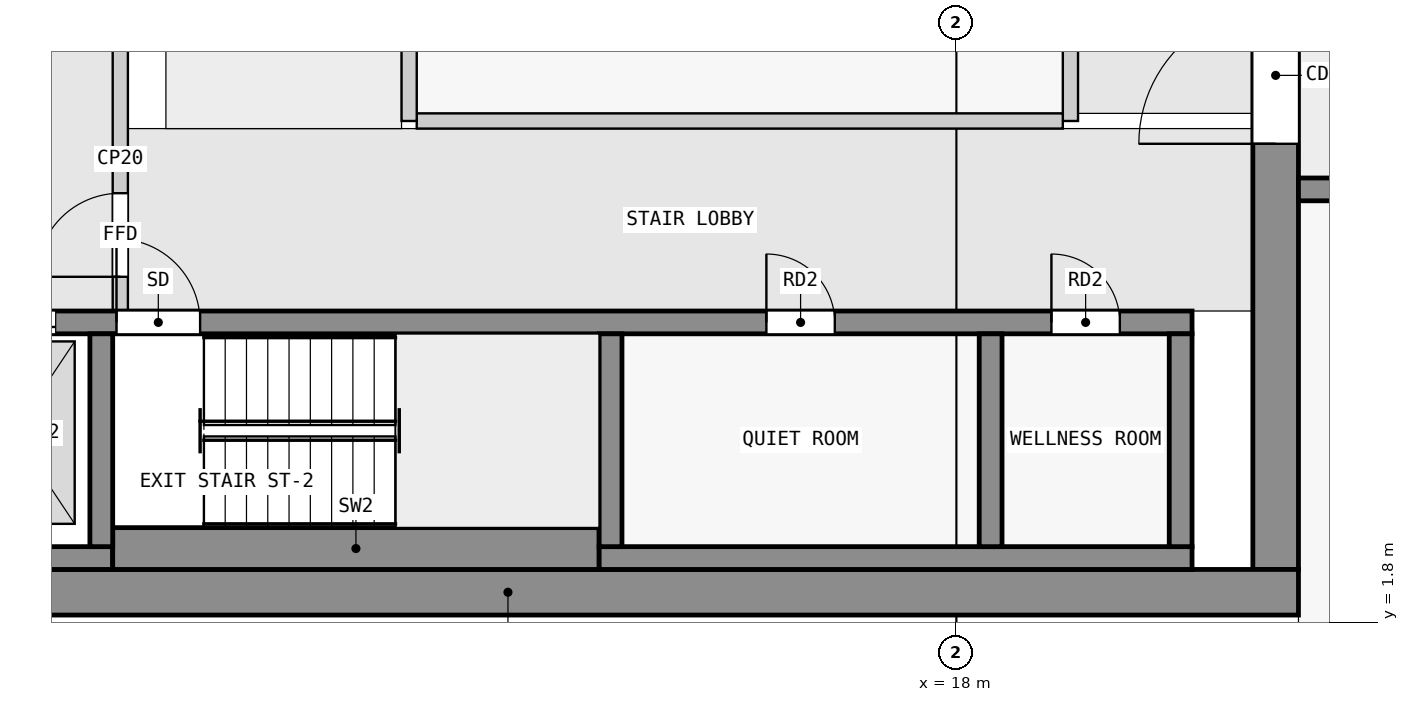
"""IFC4 building model, lengths in metres.
Left out: names, types, materials, properties, quantities, classifications, styles, units other than length and angle.
Written with IfcOpenShell. Run it as: python <this file> out.ifc"""

import sys

from ifc_helpers import new_model, si_unit, direction, frame, frame_2d, origin, place, context, subcontext, project, spatial, rectangle, extrude, element, fill, save


model = new_model("IFC4")
c1 = context("Model", 3, precision=1e-05, world=origin(), true_north=direction((0.0, 1.0)))
c2 = subcontext(c1, "Body", "Model", "MODEL_VIEW")
j1 = project(units=[si_unit("LENGTHUNIT", "METRE"), si_unit("PLANEANGLEUNIT", "RADIAN")], contexts=[c1])
p1 = place(None, origin())
s1 = spatial("IfcSite", under=j1, at=p1, CompositionType="ELEMENT")
p2 = place(p1, origin())
s2 = spatial("IfcBuilding", under=s1, at=p2, CompositionType="ELEMENT")
p3 = place(p2, frame((0.0, 0.0, 170.9)))
s3 = spatial("IfcBuildingStorey", under=s2, at=p3, CompositionType="ELEMENT", Elevation=170.9)
p4 = place(p3, frame((1.7, 2.2, 0.0), z_axis=(0.0, 0.0, 1.0), x_axis=(1.0, 0.0, 0.0)))
e1 = element("IfcWall", 1, at=p4, inside=s3, PredefinedType="SHEAR", context=c2, shape_type="SweptSolid", body=[
    extrude(rectangle(XDim=20.8, YDim=0.6, at=frame_2d((10.4, 0.0))), origin(), (0.0, 0.0, 1.0), 3.25),
])
p5 = place(p3, frame((22.2, 2.5, 0.0), z_axis=(0.0, 0.0, 1.0), x_axis=(0.0, 1.0, 0.0)))
e2 = element("IfcWall", 2, at=p5, inside=s3, PredefinedType="SHEAR", context=c2, shape_type="SweptSolid", body=[
    extrude(rectangle(XDim=14.9, YDim=0.6, at=frame_2d((7.45, 0.0))), origin(), (0.0, 0.0, 1.0), 3.25),
])
p6 = place(p5, frame((5.6, 0.0, 0.0)))
e3 = element("IfcOpeningElement", 3, at=p6, cuts=e2, PredefinedType="OPENING", context=c2, shape_type="SweptSolid", body=[
    extrude(rectangle(XDim=1.8, YDim=2.1, at=frame_2d((0.9, 1.05))), frame((0.0, 0.31, 0.0), z_axis=(0.0, -1.0, 0.0), x_axis=(1.0, 0.0, 0.0)), (0.0, 0.0, 1.0), 0.62),
])
p7 = place(p3, frame((2.3, 2.65, 0.0), z_axis=(0.0, 0.0, 1.0), x_axis=(1.0, 0.0, 0.0)))
e4 = element("IfcWall", 4, at=p7, inside=s3, PredefinedType="SHEAR", context=c2, shape_type="SweptSolid", body=[
    extrude(rectangle(XDim=4.6, YDim=0.3, at=frame_2d((2.3, 0.0))), origin(), (0.0, 0.0, 1.0), 3.25),
])
p8 = place(p3, frame((6.9, 2.775, 0.0), z_axis=(0.0, 0.0, 1.0), x_axis=(1.0, 0.0, 0.0)))
e5 = element("IfcWall", 5, at=p8, inside=s3, PredefinedType="SHEAR", context=c2, shape_type="SweptSolid", body=[
    extrude(rectangle(XDim=6.4, YDim=0.55, at=frame_2d((3.2, 0.0))), origin(), (0.0, 0.0, 1.0), 3.25),
])
p9 = place(p3, frame((13.3, 2.65, 0.0), z_axis=(0.0, 0.0, 1.0), x_axis=(1.0, 0.0, 0.0)))
e6 = element("IfcWall", 6, at=p9, inside=s3, PredefinedType="SHEAR", context=c2, shape_type="SweptSolid", body=[
    extrude(rectangle(XDim=7.8, YDim=0.3, at=frame_2d((3.9, 0.0))), origin(), (0.0, 0.0, 1.0), 3.25),
])
for number, where, z_axis, x_axis in (
    (7, (6.75, 2.8, 0.0), (0.0, 0.0, 1.0), (0.0, 1.0, 0.0)),
    (8, (13.45, 2.8, 0.0), (0.0, 0.0, 1.0), (0.0, 1.0, 0.0)),
    (9, (18.45, 2.8, 0.0), (0.0, 0.0, 1.0), (0.0, 1.0, 0.0)),
    (10, (20.95, 2.8, 0.0), (0.0, 0.0, 1.0), (0.0, 1.0, 0.0)),
):
    element("IfcWall", number, at=place(p3, frame(where, z_axis=z_axis, x_axis=x_axis)), inside=s3, PredefinedType="SHEAR", context=c2, shape_type="SweptSolid", body=[
        extrude(rectangle(XDim=2.8, YDim=0.3, at=frame_2d((1.4, 0.0))), origin(), (0.0, 0.0, 1.0), 3.25),
    ])
p10 = place(p3, frame((2.3, 5.75, 0.0), z_axis=(0.0, 0.0, 1.0), x_axis=(1.0, 0.0, 0.0)))
e11 = element("IfcWall", 11, at=p10, inside=s3, PredefinedType="SHEAR", context=c2, shape_type="SweptSolid", body=[
    extrude(rectangle(XDim=18.8, YDim=0.3, at=frame_2d((9.4, 0.0))), origin(), (0.0, 0.0, 1.0), 3.25),
])
p11 = place(p10, frame((4.65, 0.0, 0.0)))
e12 = element("IfcOpeningElement", 12, at=p11, cuts=e11, PredefinedType="OPENING", context=c2, shape_type="SweptSolid", body=[
    extrude(rectangle(XDim=1.1, YDim=2.1, at=frame_2d((0.55, 1.05))), frame((0.0, 0.16, 0.0), z_axis=(0.0, -1.0, 0.0), x_axis=(1.0, 0.0, 0.0)), (0.0, 0.0, 1.0), 0.32),
])
p12 = place(p10, frame((0.45, 0.0, 0.0)))
e13 = element("IfcOpeningElement", 13, at=p12, cuts=e11, PredefinedType="OPENING", context=c2, shape_type="SweptSolid", body=[
    extrude(rectangle(XDim=1.1, YDim=2.1, at=frame_2d((0.55, 1.05))), frame((0.0, 0.16, 0.0), z_axis=(0.0, -1.0, 0.0), x_axis=(1.0, 0.0, 0.0)), (0.0, 0.0, 1.0), 0.32),
])
p13 = place(p10, frame((2.75, 0.0, 0.0)))
e14 = element("IfcOpeningElement", 14, at=p13, cuts=e11, PredefinedType="OPENING", context=c2, shape_type="SweptSolid", body=[
    extrude(rectangle(XDim=1.1, YDim=2.1, at=frame_2d((0.55, 1.05))), frame((0.0, 0.16, 0.0), z_axis=(0.0, -1.0, 0.0), x_axis=(1.0, 0.0, 0.0)), (0.0, 0.0, 1.0), 0.32),
])
p14 = place(p10, frame((13.2, 0.0, 0.0)))
e15 = element("IfcOpeningElement", 15, at=p14, cuts=e11, PredefinedType="OPENING", context=c2, shape_type="SweptSolid", body=[
    extrude(rectangle(XDim=0.9, YDim=2.1, at=frame_2d((0.45, 1.05))), frame((0.0, 0.16, 0.0), z_axis=(0.0, -1.0, 0.0), x_axis=(1.0, 0.0, 0.0)), (0.0, 0.0, 1.0), 0.32),
])
p15 = place(p10, frame((16.95, 0.0, 0.0)))
e16 = element("IfcOpeningElement", 16, at=p15, cuts=e11, PredefinedType="OPENING", context=c2, shape_type="SweptSolid", body=[
    extrude(rectangle(XDim=0.9, YDim=2.1, at=frame_2d((0.45, 1.05))), frame((0.0, 0.16, 0.0), z_axis=(0.0, -1.0, 0.0), x_axis=(1.0, 0.0, 0.0)), (0.0, 0.0, 1.0), 0.32),
])
p16 = place(p3, frame((22.5, 7.5, 0.0), z_axis=(0.0, 0.0, 1.0), x_axis=(1.0, 0.0, 0.0)))
e17 = element("IfcWall", 17, at=p16, inside=s3, PredefinedType="SHEAR", context=c2, shape_type="SweptSolid", body=[
    extrude(rectangle(XDim=22.5, YDim=0.3, at=frame_2d((11.25, 0.0))), origin(), (0.0, 0.0, 1.0), 3.25),
])
p17 = place(p16, frame((4.05, 0.0, 0.0)))
e18 = element("IfcOpeningElement", 18, at=p17, cuts=e17, PredefinedType="OPENING", context=c2, shape_type="SweptSolid", body=[
    extrude(rectangle(XDim=1.0, YDim=2.1, at=frame_2d((0.5, 1.05))), frame((0.0, 0.16, 0.0), z_axis=(0.0, -1.0, 0.0), x_axis=(1.0, 0.0, 0.0)), (0.0, 0.0, 1.0), 0.32),
])
p18 = place(p16, frame((10.75, 0.0, 0.0)))
e19 = element("IfcOpeningElement", 19, at=p18, cuts=e17, PredefinedType="OPENING", context=c2, shape_type="SweptSolid", body=[
    extrude(rectangle(XDim=1.0, YDim=2.1, at=frame_2d((0.5, 1.05))), frame((0.0, 0.16, 0.0), z_axis=(0.0, -1.0, 0.0), x_axis=(1.0, 0.0, 0.0)), (0.0, 0.0, 1.0), 0.32),
])
p19 = place(p16, frame((15.35, 0.0, 0.0)))
e20 = element("IfcOpeningElement", 20, at=p19, cuts=e17, PredefinedType="OPENING", context=c2, shape_type="SweptSolid", body=[
    extrude(rectangle(XDim=0.9, YDim=2.1, at=frame_2d((0.45, 1.05))), frame((0.0, 0.16, 0.0), z_axis=(0.0, -1.0, 0.0), x_axis=(1.0, 0.0, 0.0)), (0.0, 0.0, 1.0), 0.32),
])
p20 = place(p16, frame((18.75, 0.0, 0.0)))
e21 = element("IfcOpeningElement", 21, at=p20, cuts=e17, PredefinedType="OPENING", context=c2, shape_type="SweptSolid", body=[
    extrude(rectangle(XDim=0.9, YDim=2.1, at=frame_2d((0.45, 1.05))), frame((0.0, 0.16, 0.0), z_axis=(0.0, -1.0, 0.0), x_axis=(1.0, 0.0, 0.0)), (0.0, 0.0, 1.0), 0.32),
])
p21 = place(p16, frame((20.95, 0.0, 0.0)))
e22 = element("IfcOpeningElement", 22, at=p21, cuts=e17, PredefinedType="OPENING", context=c2, shape_type="SweptSolid", body=[
    extrude(rectangle(XDim=1.0, YDim=2.1, at=frame_2d((0.5, 1.05))), frame((0.0, 0.16, 0.0), z_axis=(0.0, -1.0, 0.0), x_axis=(1.0, 0.0, 0.0)), (0.0, 0.0, 1.0), 0.32),
])
p22 = place(p3, frame((7.0, 5.9, 0.0), z_axis=(0.0, 0.0, 1.0), x_axis=(0.0, 1.0, 0.0)))
e23 = element("IfcWall", 23, at=p22, inside=s3, PredefinedType="PARTITIONING", context=c2, shape_type="SweptSolid", body=[
    extrude(rectangle(XDim=4.0, YDim=0.2, at=frame_2d((2.0, 0.0))), origin(), (0.0, 0.0, 1.0), 3.25),
])
p23 = place(p22, frame((0.45, 0.0, 0.0)))
e24 = element("IfcOpeningElement", 24, at=p23, cuts=e23, PredefinedType="OPENING", context=c2, shape_type="SweptSolid", body=[
    extrude(rectangle(XDim=1.1, YDim=2.1, at=frame_2d((0.55, 1.05))), frame((0.0, 0.11, 0.0), z_axis=(0.0, -1.0, 0.0), x_axis=(1.0, 0.0, 0.0)), (0.0, 0.0, 1.0), 0.22),
])
p24 = place(p3, frame((10.8, 8.4, 0.0), z_axis=(0.0, 0.0, 1.0), x_axis=(0.0, 1.0, 0.0)))
e25 = element("IfcWall", 25, at=p24, inside=s3, PredefinedType="PARTITIONING", context=c2, shape_type="SweptSolid", body=[
    extrude(rectangle(XDim=3.8, YDim=0.2, at=frame_2d((1.9, 0.0))), origin(), (0.0, 0.0, 1.0), 3.25),
])
p25 = place(p3, frame((10.9, 8.4, 0.0), z_axis=(0.0, 0.0, 1.0), x_axis=(1.0, 0.0, 0.0)))
e26 = element("IfcWall", 26, at=p25, inside=s3, PredefinedType="PARTITIONING", context=c2, shape_type="SweptSolid", body=[
    extrude(rectangle(XDim=8.5, YDim=0.2, at=frame_2d((4.25, 0.0))), origin(), (0.0, 0.0, 1.0), 3.25),
])
p26 = place(p3, frame((19.5, 8.4, 0.0), z_axis=(0.0, 0.0, 1.0), x_axis=(0.0, 1.0, 0.0)))
e27 = element("IfcWall", 27, at=p26, inside=s3, PredefinedType="PARTITIONING", context=c2, shape_type="SweptSolid", body=[
    extrude(rectangle(XDim=3.8, YDim=0.2, at=frame_2d((1.9, 0.0))), origin(), (0.0, 0.0, 1.0), 3.25),
])
p27 = place(p23, origin())
e28 = element("IfcDoor", 28, at=p27, inside=s3, OperationType="SINGLE_SWING_LEFT", PredefinedType="DOOR", context=c2, shape_type="SweptSolid", body=[
    extrude(rectangle(XDim=1.1, YDim=2.1, at=frame_2d((0.55, 1.05))), frame((0.0, 0.025, 0.0), z_axis=(0.0, -1.0, 0.0), x_axis=(1.0, 0.0, 0.0)), (0.0, 0.0, 1.0), 0.05),
])
fill(e24, e28)
p28 = place(p11, origin())
e29 = element("IfcDoor", 29, at=p28, inside=s3, OperationType="SINGLE_SWING_LEFT", PredefinedType="DOOR", context=c2, shape_type="SweptSolid", body=[
    extrude(rectangle(XDim=1.1, YDim=2.1, at=frame_2d((0.55, 1.05))), frame((0.0, 0.025, 0.0), z_axis=(0.0, -1.0, 0.0), x_axis=(1.0, 0.0, 0.0)), (0.0, 0.0, 1.0), 0.05),
])
fill(e12, e29)
p29 = place(p13, origin())
e30 = element("IfcDoor", 30, at=p29, inside=s3, OperationType="DOUBLE_DOOR_SLIDING", PredefinedType="DOOR", context=c2, shape_type="SweptSolid", body=[
    extrude(rectangle(XDim=1.1, YDim=2.1, at=frame_2d((0.55, 1.05))), frame((0.0, 0.025, 0.0), z_axis=(0.0, -1.0, 0.0), x_axis=(1.0, 0.0, 0.0)), (0.0, 0.0, 1.0), 0.05),
])
fill(e14, e30)
p30 = place(p6, origin())
e31 = element("IfcDoor", 31, at=p30, inside=s3, OperationType="DOUBLE_DOOR_SINGLE_SWING", PredefinedType="DOOR", context=c2, shape_type="SweptSolid", body=[
    extrude(rectangle(XDim=1.8, YDim=2.1, at=frame_2d((0.9, 1.05))), frame((0.0, 0.025, 0.0), z_axis=(0.0, -1.0, 0.0), x_axis=(1.0, 0.0, 0.0)), (0.0, 0.0, 1.0), 0.05),
])
fill(e3, e31)
p31 = place(p14, origin())
e32 = element("IfcDoor", 32, at=p31, inside=s3, OperationType="SINGLE_SWING_LEFT", PredefinedType="DOOR", context=c2, shape_type="SweptSolid", body=[
    extrude(rectangle(XDim=0.9, YDim=2.1, at=frame_2d((0.45, 1.05))), frame((0.0, 0.025, 0.0), z_axis=(0.0, -1.0, 0.0), x_axis=(1.0, 0.0, 0.0)), (0.0, 0.0, 1.0), 0.05),
])
fill(e15, e32)
p32 = place(p15, origin())
e33 = element("IfcDoor", 33, at=p32, inside=s3, OperationType="SINGLE_SWING_LEFT", PredefinedType="DOOR", context=c2, shape_type="SweptSolid", body=[
    extrude(rectangle(XDim=0.9, YDim=2.1, at=frame_2d((0.45, 1.05))), frame((0.0, 0.025, 0.0), z_axis=(0.0, -1.0, 0.0), x_axis=(1.0, 0.0, 0.0)), (0.0, 0.0, 1.0), 0.05),
])
fill(e16, e33)
save(model, sys.argv[1])
